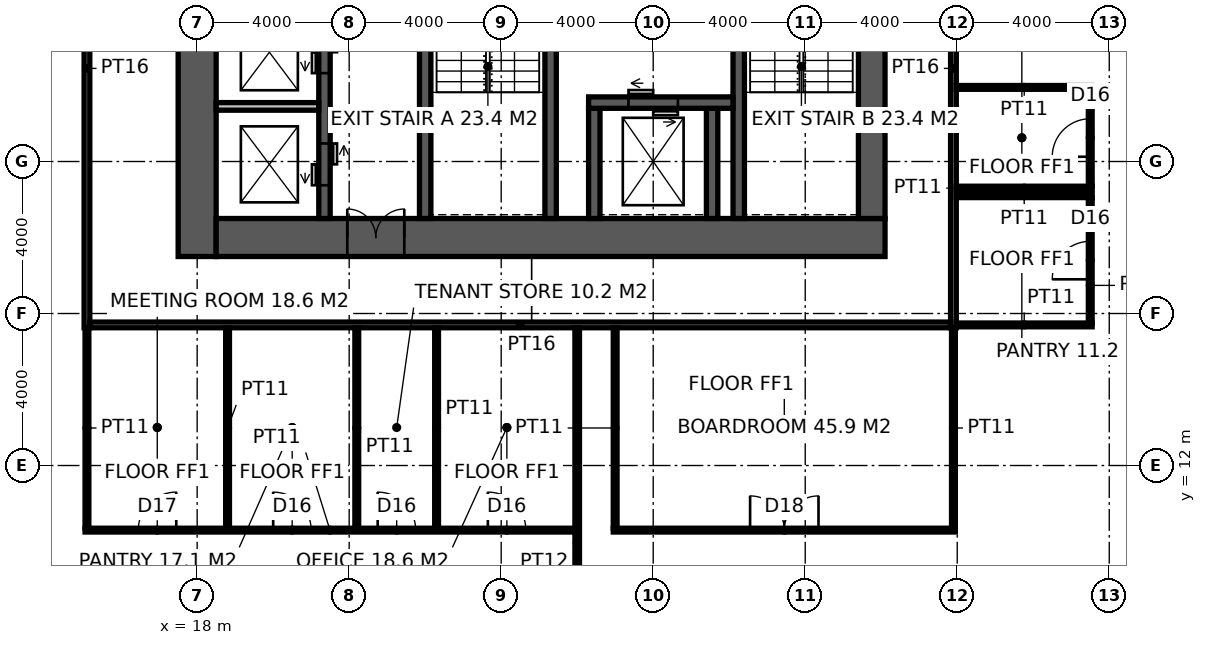
"""IFC4 building model, lengths in metres.
Left out: names, types, materials, properties, quantities, classifications, styles, units other than length and angle.
Written with IfcOpenShell. Run it as: python <this file> out.ifc"""

import sys

from ifc_helpers import new_model, si_unit, direction, frame, frame_2d, origin, place, context, subcontext, project, spatial, rectangle, extrude, element, fill, save


model = new_model("IFC4")
c1 = context("Model", 3, precision=1e-05, world=origin(), true_north=direction((0.0, 1.0)))
c2 = subcontext(c1, "Body", "Model", "MODEL_VIEW")
j1 = project(units=[si_unit("LENGTHUNIT", "METRE"), si_unit("PLANEANGLEUNIT", "RADIAN")], contexts=[c1])
p1 = place(None, origin())
s1 = spatial("IfcSite", under=j1, at=p1, CompositionType="ELEMENT")
p2 = place(p1, origin())
s2 = spatial("IfcBuilding", under=s1, at=p2, CompositionType="ELEMENT")
p3 = place(p2, frame((0.0, 0.0, 133.4)))
s3 = spatial("IfcBuildingStorey", under=s2, at=p3, CompositionType="ELEMENT", Elevation=133.4)
p4 = place(p3, frame((18.0, 17.5, -0.15), z_axis=(0.0, 0.0, 1.0), x_axis=(0.0, 1.0, 0.0)))
e1 = element("IfcWall", 1, at=p4, inside=s3, PredefinedType="SHEAR", context=c2, shape_type="SweptSolid", body=[
    extrude(rectangle(XDim=19.0, YDim=1.0, at=frame_2d((9.5, 0.0))), origin(), (0.0, 0.0, 1.0), 4.0),
])
p5 = place(p3, frame((18.5, 18.0, -0.15), z_axis=(0.0, 0.0, 1.0), x_axis=(1.0, 0.0, 0.0)))
e2 = element("IfcWall", 2, at=p5, inside=s3, PredefinedType="SHEAR", context=c2, shape_type="SweptSolid", body=[
    extrude(rectangle(XDim=17.6, YDim=1.0, at=frame_2d((8.8, 0.0))), origin(), (0.0, 0.0, 1.0), 4.0),
])
p6 = place(p5, frame((3.45, 0.0, 0.15)))
e3 = element("IfcOpeningElement", 3, at=p6, cuts=e2, PredefinedType="OPENING", context=c2, shape_type="SweptSolid", body=[
    extrude(rectangle(XDim=1.5, YDim=2.4, at=frame_2d((0.75, 1.2))), frame((0.0, 0.51, 0.0), z_axis=(0.0, -1.0, 0.0), x_axis=(1.0, 0.0, 0.0)), (0.0, 0.0, 1.0), 1.02),
])
p7 = place(p3, frame((35.75, 18.5, -0.15), z_axis=(0.0, 0.0, 1.0), x_axis=(0.0, 1.0, 0.0)))
e4 = element("IfcWall", 4, at=p7, inside=s3, PredefinedType="SHEAR", context=c2, shape_type="SweptSolid", body=[
    extrude(rectangle(XDim=17.0, YDim=0.7, at=frame_2d((8.5, 0.0))), origin(), (0.0, 0.0, 1.0), 4.0),
])
p8 = place(p7, frame((9.85, 0.0, 0.15)))
e5 = element("IfcOpeningElement", 5, at=p8, cuts=e4, PredefinedType="OPENING", context=c2, shape_type="SweptSolid", body=[
    extrude(rectangle(XDim=1.0, YDim=2.2, at=frame_2d((0.5, 1.1))), frame((0.0, 0.36, 0.0), z_axis=(0.0, -1.0, 0.0), x_axis=(1.0, 0.0, 0.0)), (0.0, 0.0, 1.0), 0.72),
])
p9 = place(p3, frame((24.0, 18.5, -0.15), z_axis=(0.0, 0.0, 1.0), x_axis=(0.0, 1.0, 0.0)))
e6 = element("IfcWall", 6, at=p9, inside=s3, PredefinedType="SHEAR", context=c2, shape_type="SweptSolid", body=[
    extrude(rectangle(XDim=17.0, YDim=0.3, at=frame_2d((8.5, 0.0))), origin(), (0.0, 0.0, 1.0), 4.0),
])
p10 = place(p9, frame((9.6, 0.0, 0.15)))
e7 = element("IfcOpeningElement", 7, at=p10, cuts=e6, PredefinedType="OPENING", context=c2, shape_type="SweptSolid", body=[
    extrude(rectangle(XDim=1.5, YDim=2.4, at=frame_2d((0.75, 1.2))), frame((0.0, 0.16, 0.0), z_axis=(0.0, -1.0, 0.0), x_axis=(1.0, 0.0, 0.0)), (0.0, 0.0, 1.0), 0.32),
])
p11 = place(p3, frame((27.3, 18.5, -0.15), z_axis=(0.0, 0.0, 1.0), x_axis=(0.0, 1.0, 0.0)))
e8 = element("IfcWall", 8, at=p11, inside=s3, PredefinedType="SHEAR", context=c2, shape_type="SweptSolid", body=[
    extrude(rectangle(XDim=7.9, YDim=0.3, at=frame_2d((3.95, 0.0))), origin(), (0.0, 0.0, 1.0), 4.0),
])
p12 = place(p11, frame((6.4, 0.0, 0.15)))
e9 = element("IfcOpeningElement", 9, at=p12, cuts=e8, PredefinedType="OPENING", context=c2, shape_type="SweptSolid", body=[
    extrude(rectangle(XDim=1.0, YDim=2.2, at=frame_2d((0.5, 1.1))), frame((0.0, 0.16, 0.0), z_axis=(0.0, -1.0, 0.0), x_axis=(1.0, 0.0, 0.0)), (0.0, 0.0, 1.0), 0.32),
])
p13 = place(p3, frame((32.25, 18.5, -0.15), z_axis=(0.0, 0.0, 1.0), x_axis=(0.0, 1.0, 0.0)))
e10 = element("IfcWall", 10, at=p13, inside=s3, PredefinedType="SHEAR", context=c2, shape_type="SweptSolid", body=[
    extrude(rectangle(XDim=7.9, YDim=0.3, at=frame_2d((3.95, 0.0))), origin(), (0.0, 0.0, 1.0), 4.0),
])
for number, where, z_axis, x_axis in (
    (11, (28.45, 18.5, -0.15), (0.0, 0.0, 1.0), (0.0, 1.0, 0.0)),
    (12, (31.55, 18.5, -0.15), (0.0, 0.0, 1.0), (0.0, 1.0, 0.0)),
):
    element("IfcWall", number, at=place(p3, frame(where, z_axis=z_axis, x_axis=x_axis)), inside=s3, PredefinedType="SHEAR", context=c2, shape_type="SweptSolid", body=[
        extrude(rectangle(XDim=2.9, YDim=0.3, at=frame_2d((1.45, 0.0))), origin(), (0.0, 0.0, 1.0), 4.0),
    ])
p14 = place(p3, frame((28.3, 21.55, -0.15), z_axis=(0.0, 0.0, 1.0), x_axis=(1.0, 0.0, 0.0)))
e13 = element("IfcWall", 13, at=p14, inside=s3, PredefinedType="SHEAR", context=c2, shape_type="SweptSolid", body=[
    extrude(rectangle(XDim=3.8, YDim=0.3, at=frame_2d((1.9, 0.0))), origin(), (0.0, 0.0, 1.0), 4.0),
])
p15 = place(p14, frame((1.05, 0.0, 0.15)))
e14 = element("IfcOpeningElement", 14, at=p15, cuts=e13, PredefinedType="OPENING", context=c2, shape_type="SweptSolid", body=[
    extrude(rectangle(XDim=1.3, YDim=2.4, at=frame_2d((0.65, 1.2))), frame((0.0, 0.16, 0.0), z_axis=(0.0, -1.0, 0.0), x_axis=(1.0, 0.0, 0.0)), (0.0, 0.0, 1.0), 0.32),
])
p16 = place(p3, frame((21.35, 18.5, -0.15), z_axis=(0.0, 0.0, 1.0), x_axis=(0.0, 1.0, 0.0)))
e15 = element("IfcWall", 15, at=p16, inside=s3, PredefinedType="SHEAR", context=c2, shape_type="SweptSolid", body=[
    extrude(rectangle(XDim=12.5, YDim=0.3, at=frame_2d((6.25, 0.0))), origin(), (0.0, 0.0, 1.0), 4.0),
])
p17 = place(p16, frame((0.875, 0.0, 0.15)))
e16 = element("IfcOpeningElement", 16, at=p17, cuts=e15, PredefinedType="OPENING", context=c2, shape_type="SweptSolid", body=[
    extrude(rectangle(XDim=1.1, YDim=2.2, at=frame_2d((0.55, 1.1))), frame((0.0, 0.16, 0.0), z_axis=(0.0, -1.0, 0.0), x_axis=(1.0, 0.0, 0.0)), (0.0, 0.0, 1.0), 0.32),
])
p18 = place(p16, frame((3.825, 0.0, 0.15)))
e17 = element("IfcOpeningElement", 17, at=p18, cuts=e15, PredefinedType="OPENING", context=c2, shape_type="SweptSolid", body=[
    extrude(rectangle(XDim=1.1, YDim=2.2, at=frame_2d((0.55, 1.1))), frame((0.0, 0.16, 0.0), z_axis=(0.0, -1.0, 0.0), x_axis=(1.0, 0.0, 0.0)), (0.0, 0.0, 1.0), 0.32),
])
p19 = place(p16, frame((6.675, 0.0, 0.15)))
e18 = element("IfcOpeningElement", 18, at=p19, cuts=e15, PredefinedType="OPENING", context=c2, shape_type="SweptSolid", body=[
    extrude(rectangle(XDim=1.1, YDim=2.2, at=frame_2d((0.55, 1.1))), frame((0.0, 0.16, 0.0), z_axis=(0.0, -1.0, 0.0), x_axis=(1.0, 0.0, 0.0)), (0.0, 0.0, 1.0), 0.32),
])
p20 = place(p16, frame((9.575, 0.0, 0.15)))
e19 = element("IfcOpeningElement", 19, at=p20, cuts=e15, PredefinedType="OPENING", context=c2, shape_type="SweptSolid", body=[
    extrude(rectangle(XDim=1.1, YDim=2.2, at=frame_2d((0.55, 1.1))), frame((0.0, 0.16, 0.0), z_axis=(0.0, -1.0, 0.0), x_axis=(1.0, 0.0, 0.0)), (0.0, 0.0, 1.0), 0.32),
])
p21 = place(p3, frame((18.5, 21.45, -0.15), z_axis=(0.0, 0.0, 1.0), x_axis=(1.0, 0.0, 0.0)))
e20 = element("IfcWall", 20, at=p21, inside=s3, PredefinedType="SOLIDWALL", context=c2, shape_type="SweptSolid", body=[
    extrude(rectangle(XDim=2.7, YDim=0.2, at=frame_2d((1.35, 0.0))), origin(), (0.0, 0.0, 1.0), 4.0),
])
p22 = place(p3, frame((15.1, 15.625, 0.0), z_axis=(0.0, 0.0, 1.0), x_axis=(0.0, 1.0, 0.0)))
e21 = element("IfcWall", 21, at=p22, inside=s3, PredefinedType="PARTITIONING", context=c2, shape_type="SweptSolid", body=[
    extrude(rectangle(XDim=22.75, YDim=0.15, at=frame_2d((11.375, 0.0))), origin(), (0.0, 0.0, 1.0), 3.85),
])
p23 = place(p22, frame((10.475, 0.0, 0.0)))
e22 = element("IfcOpeningElement", 22, at=p23, cuts=e21, PredefinedType="OPENING", context=c2, shape_type="SweptSolid", body=[
    extrude(rectangle(XDim=1.8, YDim=2.4, at=frame_2d((0.9, 1.2))), frame((0.0, 0.085, 0.0), z_axis=(0.0, -1.0, 0.0), x_axis=(1.0, 0.0, 0.0)), (0.0, 0.0, 1.0), 0.17),
])
p24 = place(p3, frame((37.9, 15.625, 0.0), z_axis=(0.0, 0.0, 1.0), x_axis=(0.0, 1.0, 0.0)))
e23 = element("IfcWall", 23, at=p24, inside=s3, PredefinedType="PARTITIONING", context=c2, shape_type="SweptSolid", body=[
    extrude(rectangle(XDim=22.75, YDim=0.15, at=frame_2d((11.375, 0.0))), origin(), (0.0, 0.0, 1.0), 2.95),
])
p25 = place(p24, frame((10.475, 0.0, 0.0)))
e24 = element("IfcOpeningElement", 24, at=p25, cuts=e23, PredefinedType="OPENING", context=c2, shape_type="SweptSolid", body=[
    extrude(rectangle(XDim=1.8, YDim=2.4, at=frame_2d((0.9, 1.2))), frame((0.0, 0.085, 0.0), z_axis=(0.0, -1.0, 0.0), x_axis=(1.0, 0.0, 0.0)), (0.0, 0.0, 1.0), 0.17),
])
p26 = place(p3, frame((15.175, 15.7, 0.0), z_axis=(0.0, 0.0, 1.0), x_axis=(1.0, 0.0, 0.0)))
e25 = element("IfcWall", 25, at=p26, inside=s3, PredefinedType="PARTITIONING", context=c2, shape_type="SweptSolid", body=[
    extrude(rectangle(XDim=22.65, YDim=0.15, at=frame_2d((11.325, 0.0))), origin(), (0.0, 0.0, 1.0), 3.85),
])
p27 = place(p3, frame((28.0, 4.3, 0.0), z_axis=(0.0, 0.0, 1.0), x_axis=(0.0, 1.0, 0.0)))
e26 = element("IfcWall", 26, at=p27, inside=s3, PredefinedType="PARTITIONING", context=c2, shape_type="SweptSolid", body=[
    extrude(rectangle(XDim=11.325, YDim=0.12, at=frame_2d((5.663, 0.0))), origin(), (0.0, 0.0, 1.0), 3.85),
])
p28 = place(p3, frame((15.05, 10.3, 0.0), z_axis=(0.0, 0.0, 1.0), x_axis=(1.0, 0.0, 0.0)))
e27 = element("IfcWall", 27, at=p28, inside=s3, PredefinedType="PARTITIONING", context=c2, shape_type="SweptSolid", body=[
    extrude(rectangle(XDim=12.889, YDim=0.1, at=frame_2d((6.444, 0.0))), origin(), (0.0, 0.0, 1.0), 3.85),
])
p29 = place(p28, frame((1.4, 0.0, 0.0)))
e28 = element("IfcOpeningElement", 28, at=p29, cuts=e27, PredefinedType="OPENING", context=c2, shape_type="SweptSolid", body=[
    extrude(rectangle(XDim=1.0, YDim=2.2, at=frame_2d((0.5, 1.1))), frame((0.0, 0.06, 0.0), z_axis=(0.0, -1.0, 0.0), x_axis=(1.0, 0.0, 0.0)), (0.0, 0.0, 1.0), 0.12),
])
p30 = place(p28, frame((4.95, 0.0, 0.0)))
e29 = element("IfcOpeningElement", 29, at=p30, cuts=e27, PredefinedType="OPENING", context=c2, shape_type="SweptSolid", body=[
    extrude(rectangle(XDim=1.0, YDim=2.2, at=frame_2d((0.5, 1.1))), frame((0.0, 0.06, 0.0), z_axis=(0.0, -1.0, 0.0), x_axis=(1.0, 0.0, 0.0)), (0.0, 0.0, 1.0), 0.12),
])
p31 = place(p28, frame((7.7, 0.0, 0.0)))
e30 = element("IfcOpeningElement", 30, at=p31, cuts=e27, PredefinedType="OPENING", context=c2, shape_type="SweptSolid", body=[
    extrude(rectangle(XDim=1.0, YDim=2.2, at=frame_2d((0.5, 1.1))), frame((0.0, 0.06, 0.0), z_axis=(0.0, -1.0, 0.0), x_axis=(1.0, 0.0, 0.0)), (0.0, 0.0, 1.0), 0.12),
])
p32 = place(p28, frame((10.6, 0.0, 0.0)))
e31 = element("IfcOpeningElement", 31, at=p32, cuts=e27, PredefinedType="OPENING", context=c2, shape_type="SweptSolid", body=[
    extrude(rectangle(XDim=1.0, YDim=2.2, at=frame_2d((0.5, 1.1))), frame((0.0, 0.06, 0.0), z_axis=(0.0, -1.0, 0.0), x_axis=(1.0, 0.0, 0.0)), (0.0, 0.0, 1.0), 0.12),
])
p33 = place(p3, frame((28.949, 10.3, 0.0), z_axis=(0.0, 0.0, 1.0), x_axis=(1.0, 0.0, 0.0)))
e32 = element("IfcWall", 32, at=p33, inside=s3, PredefinedType="PARTITIONING", context=c2, shape_type="SweptSolid", body=[
    extrude(rectangle(XDim=9.001, YDim=0.1, at=frame_2d((4.5, 0.0))), origin(), (0.0, 0.0, 1.0), 3.85),
])
p34 = place(p33, frame((3.601, 0.0, 0.0)))
e33 = element("IfcOpeningElement", 33, at=p34, cuts=e32, PredefinedType="OPENING", context=c2, shape_type="SweptSolid", body=[
    extrude(rectangle(XDim=1.8, YDim=2.4, at=frame_2d((0.9, 1.2))), frame((0.0, 0.06, 0.0), z_axis=(0.0, -1.0, 0.0), x_axis=(1.0, 0.0, 0.0)), (0.0, 0.0, 1.0), 0.12),
])
for number, where, z_axis, x_axis in (
    (34, (37.975, 15.7, 0.0), (0.0, 0.0, 1.0), (1.0, 0.0, 0.0)),
    (35, (37.975, 19.1, 0.0), (0.0, 0.0, 1.0), (1.0, 0.0, 0.0)),
    (36, (37.975, 19.3, 0.0), (0.0, 0.0, 1.0), (1.0, 0.0, 0.0)),
    (37, (37.975, 21.95, 0.0), (0.0, 0.0, 1.0), (1.0, 0.0, 0.0)),
):
    element("IfcWall", number, at=place(p3, frame(where, z_axis=z_axis, x_axis=x_axis)), inside=s3, PredefinedType="PARTITIONING", context=c2, shape_type="SweptSolid", body=[
        extrude(rectangle(XDim=3.575, YDim=0.1, at=frame_2d((1.788, 0.0))), origin(), (0.0, 0.0, 1.0), 3.85),
    ])
for number, where, z_axis, x_axis in (
    (38, (15.1, 10.35, 0.0), (0.0, 0.0, 1.0), (0.0, 1.0, 0.0)),
    (39, (18.8, 10.35, 0.0), (0.0, 0.0, 1.0), (0.0, 1.0, 0.0)),
    (40, (22.2, 10.35, 0.0), (0.0, 0.0, 1.0), (0.0, 1.0, 0.0)),
    (41, (24.3, 10.35, 0.0), (0.0, 0.0, 1.0), (0.0, 1.0, 0.0)),
    (42, (28.999, 10.35, 0.0), (0.0, 0.0, 1.0), (0.0, 1.0, 0.0)),
):
    element("IfcWall", number, at=place(p3, frame(where, z_axis=z_axis, x_axis=x_axis)), inside=s3, PredefinedType="PARTITIONING", context=c2, shape_type="SweptSolid", body=[
        extrude(rectangle(XDim=5.275, YDim=0.1, at=frame_2d((2.637, 0.0))), origin(), (0.0, 0.0, 1.0), 3.85),
    ])
p35 = place(p3, frame((37.9, 10.35, 0.0), z_axis=(0.0, 0.0, 1.0), x_axis=(0.0, 1.0, 0.0)))
e43 = element("IfcWall", 43, at=p35, inside=s3, PredefinedType="PARTITIONING", context=c2, shape_type="SweptSolid", body=[
    extrude(rectangle(XDim=5.275, YDim=0.1, at=frame_2d((2.637, 0.0))), origin(), (0.0, 0.0, 1.0), 2.95),
])
p36 = place(p3, frame((41.5, 15.75, 0.0), z_axis=(0.0, 0.0, 1.0), x_axis=(0.0, 1.0, 0.0)))
e44 = element("IfcWall", 44, at=p36, inside=s3, PredefinedType="PARTITIONING", context=c2, shape_type="SweptSolid", body=[
    extrude(rectangle(XDim=3.3, YDim=0.1, at=frame_2d((1.65, 0.0))), origin(), (0.0, 0.0, 1.0), 3.85),
])
p37 = place(p36, frame((1.15, 0.0, 0.0)))
e45 = element("IfcOpeningElement", 45, at=p37, cuts=e44, PredefinedType="OPENING", context=c2, shape_type="SweptSolid", body=[
    extrude(rectangle(XDim=1.0, YDim=2.2, at=frame_2d((0.5, 1.1))), frame((0.0, 0.06, 0.0), z_axis=(0.0, -1.0, 0.0), x_axis=(1.0, 0.0, 0.0)), (0.0, 0.0, 1.0), 0.12),
])
p38 = place(p3, frame((41.5, 19.35, 0.0), z_axis=(0.0, 0.0, 1.0), x_axis=(0.0, 1.0, 0.0)))
e46 = element("IfcWall", 46, at=p38, inside=s3, PredefinedType="PARTITIONING", context=c2, shape_type="SweptSolid", body=[
    extrude(rectangle(XDim=2.55, YDim=0.1, at=frame_2d((1.275, 0.0))), origin(), (0.0, 0.0, 1.0), 3.85),
])
p39 = place(p38, frame((0.775, 0.0, 0.0)))
e47 = element("IfcOpeningElement", 47, at=p39, cuts=e46, PredefinedType="OPENING", context=c2, shape_type="SweptSolid", body=[
    extrude(rectangle(XDim=1.0, YDim=2.2, at=frame_2d((0.5, 1.1))), frame((0.0, 0.06, 0.0), z_axis=(0.0, -1.0, 0.0), x_axis=(1.0, 0.0, 0.0)), (0.0, 0.0, 1.0), 0.12),
])
p40 = place(p6, origin())
e48 = element("IfcDoor", 48, at=p40, inside=s3, OperationType="DOUBLE_DOOR_DOUBLE_SWING", PredefinedType="DOOR", context=c2, shape_type="SweptSolid", body=[
    extrude(rectangle(XDim=1.5, YDim=2.4, at=frame_2d((0.75, 1.2))), frame((0.0, 0.025, 0.0), z_axis=(0.0, -1.0, 0.0), x_axis=(1.0, 0.0, 0.0)), (0.0, 0.0, 1.0), 0.05),
])
fill(e3, e48)
p41 = place(p29, origin())
e49 = element("IfcDoor", 49, at=p41, inside=s3, OperationType="SINGLE_SWING_RIGHT", PredefinedType="DOOR", context=c2, shape_type="SweptSolid", body=[
    extrude(rectangle(XDim=1.0, YDim=2.2, at=frame_2d((0.5, 1.1))), frame((0.0, 0.025, 0.0), z_axis=(0.0, -1.0, 0.0), x_axis=(1.0, 0.0, 0.0)), (0.0, 0.0, 1.0), 0.05),
])
fill(e28, e49)
p42 = place(p30, origin())
e50 = element("IfcDoor", 50, at=p42, inside=s3, OperationType="SINGLE_SWING_LEFT", PredefinedType="DOOR", context=c2, shape_type="SweptSolid", body=[
    extrude(rectangle(XDim=1.0, YDim=2.2, at=frame_2d((0.5, 1.1))), frame((0.0, 0.025, 0.0), z_axis=(0.0, -1.0, 0.0), x_axis=(1.0, 0.0, 0.0)), (0.0, 0.0, 1.0), 0.05),
])
fill(e29, e50)
p43 = place(p31, origin())
e51 = element("IfcDoor", 51, at=p43, inside=s3, OperationType="SINGLE_SWING_LEFT", PredefinedType="DOOR", context=c2, shape_type="SweptSolid", body=[
    extrude(rectangle(XDim=1.0, YDim=2.2, at=frame_2d((0.5, 1.1))), frame((0.0, 0.025, 0.0), z_axis=(0.0, -1.0, 0.0), x_axis=(1.0, 0.0, 0.0)), (0.0, 0.0, 1.0), 0.05),
])
fill(e30, e51)
p44 = place(p32, origin())
e52 = element("IfcDoor", 52, at=p44, inside=s3, OperationType="SINGLE_SWING_LEFT", PredefinedType="DOOR", context=c2, shape_type="SweptSolid", body=[
    extrude(rectangle(XDim=1.0, YDim=2.2, at=frame_2d((0.5, 1.1))), frame((0.0, 0.025, 0.0), z_axis=(0.0, -1.0, 0.0), x_axis=(1.0, 0.0, 0.0)), (0.0, 0.0, 1.0), 0.05),
])
fill(e31, e52)
p45 = place(p34, origin())
e53 = element("IfcDoor", 53, at=p45, inside=s3, OperationType="DOUBLE_DOOR_DOUBLE_SWING", PredefinedType="DOOR", context=c2, shape_type="SweptSolid", body=[
    extrude(rectangle(XDim=1.8, YDim=2.4, at=frame_2d((0.9, 1.2))), frame((0.0, 0.025, 0.0), z_axis=(0.0, -1.0, 0.0), x_axis=(1.0, 0.0, 0.0)), (0.0, 0.0, 1.0), 0.05),
])
fill(e33, e53)
p46 = place(p37, origin())
e54 = element("IfcDoor", 54, at=p46, inside=s3, OperationType="SINGLE_SWING_LEFT", PredefinedType="DOOR", context=c2, shape_type="SweptSolid", body=[
    extrude(rectangle(XDim=1.0, YDim=2.2, at=frame_2d((0.5, 1.1))), frame((0.0, 0.025, 0.0), z_axis=(0.0, -1.0, 0.0), x_axis=(1.0, 0.0, 0.0)), (0.0, 0.0, 1.0), 0.05),
])
fill(e45, e54)
p47 = place(p39, origin())
e55 = element("IfcDoor", 55, at=p47, inside=s3, OperationType="SINGLE_SWING_LEFT", PredefinedType="DOOR", context=c2, shape_type="SweptSolid", body=[
    extrude(rectangle(XDim=1.0, YDim=2.2, at=frame_2d((0.5, 1.1))), frame((0.0, 0.025, 0.0), z_axis=(0.0, -1.0, 0.0), x_axis=(1.0, 0.0, 0.0)), (0.0, 0.0, 1.0), 0.05),
])
fill(e47, e55)
p48 = place(p15, origin())
e56 = element("IfcDoor", 56, at=p48, inside=s3, OperationType="DOUBLE_DOOR_SLIDING", PredefinedType="DOOR", context=c2, shape_type="SweptSolid", body=[
    extrude(rectangle(XDim=1.3, YDim=2.4, at=frame_2d((0.65, 1.2))), frame((0.0, 0.025, 0.0), z_axis=(0.0, -1.0, 0.0), x_axis=(1.0, 0.0, 0.0)), (0.0, 0.0, 1.0), 0.05),
])
fill(e14, e56)
p49 = place(p17, origin())
e57 = element("IfcDoor", 57, at=p49, inside=s3, OperationType="DOUBLE_DOOR_SLIDING", PredefinedType="DOOR", context=c2, shape_type="SweptSolid", body=[
    extrude(rectangle(XDim=1.1, YDim=2.2, at=frame_2d((0.55, 1.1))), frame((0.0, 0.025, 0.0), z_axis=(0.0, -1.0, 0.0), x_axis=(1.0, 0.0, 0.0)), (0.0, 0.0, 1.0), 0.05),
])
fill(e16, e57)
p50 = place(p18, origin())
e58 = element("IfcDoor", 58, at=p50, inside=s3, OperationType="DOUBLE_DOOR_SLIDING", PredefinedType="DOOR", context=c2, shape_type="SweptSolid", body=[
    extrude(rectangle(XDim=1.1, YDim=2.2, at=frame_2d((0.55, 1.1))), frame((0.0, 0.025, 0.0), z_axis=(0.0, -1.0, 0.0), x_axis=(1.0, 0.0, 0.0)), (0.0, 0.0, 1.0), 0.05),
])
fill(e17, e58)
save(model, sys.argv[1])
